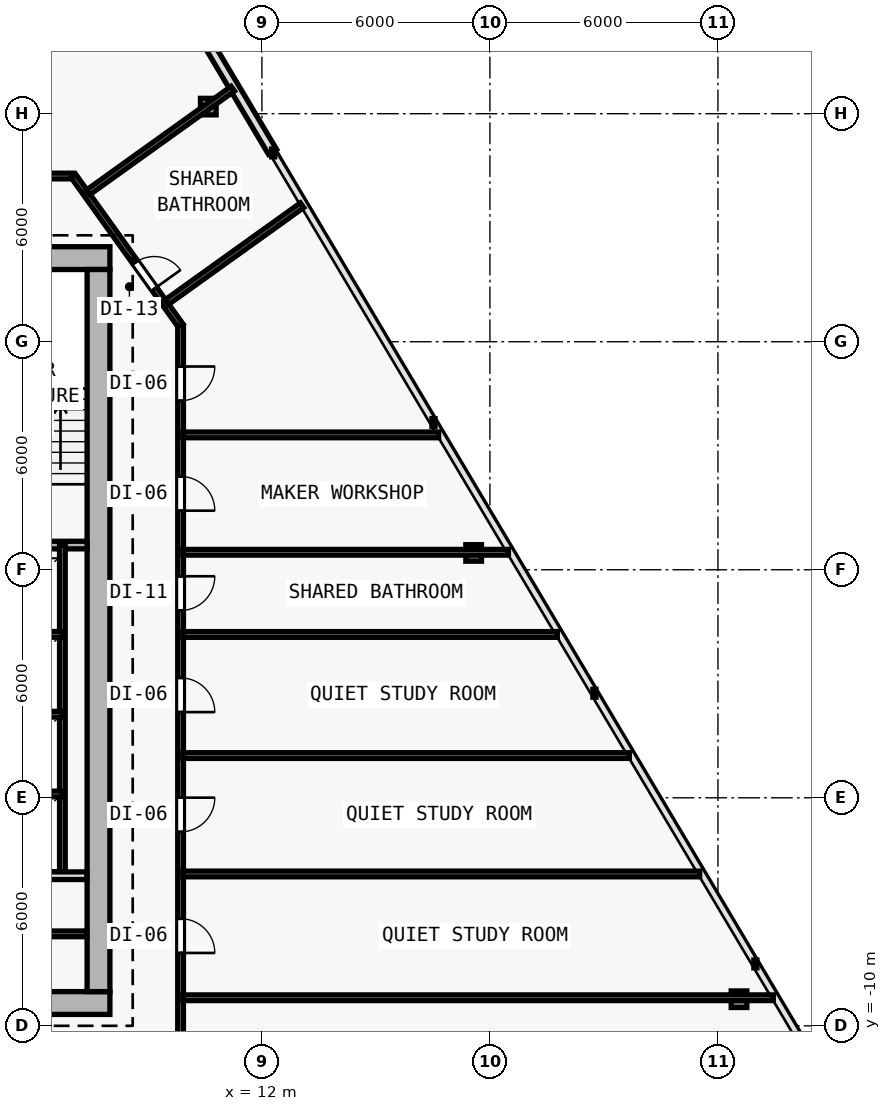
"""IFC4 building model, lengths in metres.
Left out: names, types, materials, properties, quantities, classifications, styles, units other than length and angle.
Written with IfcOpenShell. Run it as: python <this file> out.ifc"""

import sys

from ifc_helpers import new_model, si_unit, direction, frame, frame_2d, origin, origin_2d, place, context, subcontext, project, spatial, rectangle, i_section, extrude, element, fill, save


model = new_model("IFC4")
c1 = context("Model", 3, precision=1e-05, world=origin(), true_north=direction((0.0, 1.0)))
c2 = subcontext(c1, "Body", "Model", "MODEL_VIEW")
j1 = project(units=[si_unit("LENGTHUNIT", "METRE"), si_unit("PLANEANGLEUNIT", "RADIAN")], contexts=[c1])
p1 = place(None, origin())
s1 = spatial("IfcSite", under=j1, at=p1, CompositionType="ELEMENT")
p2 = place(p1, origin())
s2 = spatial("IfcBuilding", under=s1, at=p2, CompositionType="ELEMENT")
p3 = place(p2, frame((0.0, 0.0, 51.6)))
s3 = spatial("IfcBuildingStorey", under=s2, at=p3, CompositionType="ELEMENT", Elevation=51.6)
for number, where, z_axis, x_axis in (
    (1, (7.7, -9.4, 0.0), (0.0, 0.0, 1.0), (1.0, 0.0, 0.0)),
    (2, (7.7, 10.2, 0.0), (0.0, 0.0, 1.0), (1.0, 0.0, 0.0)),
    (3, (7.7, 0.4, 0.0), (0.0, 0.0, 1.0), (1.0, 0.0, 0.0)),
):
    element("IfcColumn", number, at=place(p3, frame(where, z_axis=z_axis, x_axis=x_axis)), inside=s3, PredefinedType="COLUMN", context=c2, shape_type="SweptSolid", body=[
        extrude(i_section(OverallWidth=0.416, OverallDepth=0.446, WebThickness=0.025, FlangeThickness=0.04, FilletRadius=0.015, at=origin_2d()), origin(), (0.0, 0.0, 1.0), 3.6),
    ])
p4 = place(p3, frame((24.555, -9.3, 0.005), z_axis=(-0.026105663043, 0.021618752208, 0.999425396871), x_axis=(-0.637813971185, -0.770190455771, 0.0)))
e4 = element("IfcColumn", 4, at=p4, inside=s3, PredefinedType="COLUMN", context=c2, shape_type="SweptSolid", body=[
    extrude(i_section(OverallWidth=0.412, OverallDepth=0.435, WebThickness=0.023, FlangeThickness=0.037, FilletRadius=0.015, at=origin_2d()), origin(), (0.0, 0.0, 1.0), 3.591),
])
p5 = place(p3, frame((17.572, 2.443, 0.005), z_axis=(-0.018906041, 0.009521027842, 0.999775930718), x_axis=(-0.449781931574, -0.893138406984, 0.0)))
e5 = element("IfcColumn", 5, at=p5, inside=s3, PredefinedType="COLUMN", context=c2, shape_type="SweptSolid", body=[
    extrude(i_section(OverallWidth=0.412, OverallDepth=0.435, WebThickness=0.023, FlangeThickness=0.037, FilletRadius=0.015, at=origin_2d()), origin(), (0.0, 0.0, 1.0), 3.59),
])
p6 = place(p3, frame((10.589, 14.186, 0.005), z_axis=(-0.011699046613, -0.002516655376, 0.999928396814), x_axis=(0.210305364179, -0.977635746993, 0.0)))
e6 = element("IfcColumn", 6, at=p6, inside=s3, PredefinedType="COLUMN", context=c2, shape_type="SweptSolid", body=[
    extrude(i_section(OverallWidth=0.412, OverallDepth=0.435, WebThickness=0.023, FlangeThickness=0.037, FilletRadius=0.015, at=origin_2d()), origin(), (0.0, 0.0, 1.0), 3.589),
])
p7 = place(p3, frame((6.328, 23.006, 0.0), z_axis=(0.0, 0.0, 1.0), x_axis=(0.511075811474, -0.859535639125, 0.0)))
e7 = element("IfcWall", 7, at=p7, inside=s3, PredefinedType="SOLIDWALL", context=c2, shape_type="SweptSolid", body=[
    extrude(rectangle(XDim=11.646, YDim=0.25, at=frame_2d((5.823, 0.0))), origin(), (0.0, 0.0, 1.0), 3.35),
])
p8 = place(p7, frame((5.273, 0.0, 0.62)))
e8 = element("IfcOpeningElement", 8, at=p8, cuts=e7, PredefinedType="OPENING", context=c2, shape_type="SweptSolid", body=[
    extrude(rectangle(XDim=1.1, YDim=1.8, at=frame_2d((0.55, 0.9))), frame((0.0, 0.135, 0.0), z_axis=(0.0, -1.0, 0.0), x_axis=(1.0, 0.0, 0.0)), (0.0, 0.0, 1.0), 0.27),
])
p9 = place(p3, frame((-8.0, -9.4, 0.0), z_axis=(0.0, 0.0, 1.0), x_axis=(1.0, 0.0, 0.0)))
e9 = element("IfcWall", 9, at=p9, inside=s3, PredefinedType="SHEAR", context=c2, shape_type="SweptSolid", body=[
    extrude(rectangle(XDim=16.0, YDim=0.6, at=frame_2d((8.0, 0.0))), origin(), (0.0, 0.0, 1.0), 3.35),
])
p10 = place(p9, frame((9.65, 0.0, 0.0)))
e10 = element("IfcOpeningElement", 10, at=p10, cuts=e9, PredefinedType="OPENING", context=c2, shape_type="SweptSolid", body=[
    extrude(rectangle(XDim=1.5, YDim=2.2, at=frame_2d((0.75, 1.1))), frame((0.0, 0.31, 0.0), z_axis=(0.0, -1.0, 0.0), x_axis=(1.0, 0.0, 0.0)), (0.0, 0.0, 1.0), 0.62),
])
p11 = place(p3, frame((8.0, 10.2, 0.0), z_axis=(0.0, 0.0, 1.0), x_axis=(-1.0, 0.0, 0.0)))
e11 = element("IfcWall", 11, at=p11, inside=s3, PredefinedType="SHEAR", context=c2, shape_type="SweptSolid", body=[
    extrude(rectangle(XDim=16.0, YDim=0.6, at=frame_2d((8.0, 0.0))), origin(), (0.0, 0.0, 1.0), 3.35),
])
p12 = place(p11, frame((4.45, 0.0, 0.0)))
e12 = element("IfcOpeningElement", 12, at=p12, cuts=e11, PredefinedType="OPENING", context=c2, shape_type="SweptSolid", body=[
    extrude(rectangle(XDim=1.1, YDim=2.15, at=frame_2d((0.55, 1.075))), frame((0.0, 0.31, 0.0), z_axis=(0.0, -1.0, 0.0), x_axis=(1.0, 0.0, 0.0)), (0.0, 0.0, 1.0), 0.62),
])
p13 = place(p3, frame((7.7, 9.9, 0.0), z_axis=(0.0, 0.0, 1.0), x_axis=(0.0, -1.0, 0.0)))
e13 = element("IfcWall", 13, at=p13, inside=s3, PredefinedType="SHEAR", context=c2, shape_type="SweptSolid", body=[
    extrude(rectangle(XDim=19.0, YDim=0.6, at=frame_2d((9.5, 0.0))), origin(), (0.0, 0.0, 1.0), 3.35),
])
p14 = place(p3, frame((4.05, 2.65, 0.0), z_axis=(0.0, 0.0, 1.0), x_axis=(1.0, 0.0, 0.0)))
e14 = element("IfcWall", 14, at=p14, inside=s3, PredefinedType="SOLIDWALL", context=c2, shape_type="SweptSolid", body=[
    extrude(rectangle(XDim=3.35, YDim=0.2, at=frame_2d((1.675, 0.0))), origin(), (0.0, 0.0, 1.0), 3.35),
])
p15 = place(p3, frame((6.75, -6.05, 0.0), z_axis=(0.0, 0.0, 1.0), x_axis=(0.0, 1.0, 0.0)))
e15 = element("IfcWall", 15, at=p15, inside=s3, PredefinedType="PARTITIONING", context=c2, shape_type="SweptSolid", body=[
    extrude(rectangle(XDim=8.7, YDim=0.15, at=frame_2d((4.35, 0.0))), origin(), (0.0, 0.0, 1.0), 3.35),
])
for number, where, z_axis, x_axis in (
    (16, (4.15, -3.9, 0.0), (0.0, 0.0, 1.0), (1.0, 0.0, 0.0)),
    (17, (4.15, -1.8, 0.0), (0.0, 0.0, 1.0), (1.0, 0.0, 0.0)),
    (18, (4.15, 0.3, 0.0), (0.0, 0.0, 1.0), (1.0, 0.0, 0.0)),
):
    element("IfcWall", number, at=place(p3, frame(where, z_axis=z_axis, x_axis=x_axis)), inside=s3, PredefinedType="PARTITIONING", context=c2, shape_type="SweptSolid", body=[
        extrude(rectangle(XDim=2.6, YDim=0.15, at=frame_2d((1.3, 0.0))), origin(), (0.0, 0.0, 1.0), 3.35),
    ])
p16 = place(p3, frame((4.15, -6.05, 0.0), z_axis=(0.0, 0.0, 1.0), x_axis=(1.0, 0.0, 0.0)))
e19 = element("IfcWall", 19, at=p16, inside=s3, PredefinedType="SOLIDWALL", context=c2, shape_type="SweptSolid", body=[
    extrude(rectangle(XDim=3.245, YDim=0.2, at=frame_2d((1.623, 0.0))), origin(), (0.0, 0.0, 1.0), 3.35),
])
p17 = place(p3, frame((4.15, -7.58, 0.0), z_axis=(0.0, 0.0, 1.0), x_axis=(1.0, 0.0, 0.0)))
e20 = element("IfcWall", 20, at=p17, inside=s3, PredefinedType="PARTITIONING", context=c2, shape_type="SweptSolid", body=[
    extrude(rectangle(XDim=3.245, YDim=0.15, at=frame_2d((1.623, 0.0))), origin(), (0.0, 0.0, 1.0), 3.35),
])
p18 = place(p3, frame((-7.041, 12.36, 0.0), z_axis=(0.0, 0.0, 1.0), x_axis=(1.0, 0.0, 0.0)))
e21 = element("IfcWall", 21, at=p18, inside=s3, PredefinedType="PARTITIONING", context=c2, shape_type="SweptSolid", body=[
    extrude(rectangle(XDim=14.082, YDim=0.15, at=frame_2d((7.041, 0.0))), origin(), (0.0, 0.0, 1.0), 3.35),
])
p19 = place(p18, frame((10.042, 0.0, 0.0)))
e22 = element("IfcOpeningElement", 22, at=p19, cuts=e21, PredefinedType="OPENING", context=c2, shape_type="SweptSolid", body=[
    extrude(rectangle(XDim=0.9, YDim=2.1, at=frame_2d((0.45, 1.05))), frame((0.0, 0.085, 0.0), z_axis=(0.0, -1.0, 0.0), x_axis=(1.0, 0.0, 0.0)), (0.0, 0.0, 1.0), 0.17),
])
p20 = place(p18, frame((3.179, 0.0, 0.0)))
e23 = element("IfcOpeningElement", 23, at=p20, cuts=e21, PredefinedType="OPENING", context=c2, shape_type="SweptSolid", body=[
    extrude(rectangle(XDim=0.9, YDim=2.1, at=frame_2d((0.45, 1.05))), frame((0.0, 0.085, 0.0), z_axis=(0.0, -1.0, 0.0), x_axis=(1.0, 0.0, 0.0)), (0.0, 0.0, 1.0), 0.17),
])
p21 = place(p3, frame((7.041, 12.36, 0.0), z_axis=(0.0, 0.0, 1.0), x_axis=(0.582449511476, -0.812866881218, 0.0)))
e24 = element("IfcWall", 24, at=p21, inside=s3, PredefinedType="PARTITIONING", context=c2, shape_type="SweptSolid", body=[
    extrude(rectangle(XDim=4.84, YDim=0.15, at=frame_2d((2.42, 0.0))), origin(), (0.0, 0.0, 1.0), 2.725),
])
p22 = place(p21, frame((2.801, 0.0, 0.0)))
e25 = element("IfcOpeningElement", 25, at=p22, cuts=e24, PredefinedType="OPENING", context=c2, shape_type="SweptSolid", body=[
    extrude(rectangle(XDim=0.85, YDim=2.1, at=frame_2d((0.425, 1.05))), frame((0.0, 0.085, 0.0), z_axis=(0.0, -1.0, 0.0), x_axis=(1.0, 0.0, 0.0)), (0.0, 0.0, 1.0), 0.17),
])
p23 = place(p3, frame((9.86, 8.426, 0.0), z_axis=(0.0, 0.0, 1.0), x_axis=(0.0, -1.0, 0.0)))
e26 = element("IfcWall", 26, at=p23, inside=s3, PredefinedType="PARTITIONING", context=c2, shape_type="SweptSolid", body=[
    extrude(rectangle(XDim=19.986, YDim=0.15, at=frame_2d((9.993, 0.0))), origin(), (0.0, 0.0, 1.0), 2.609),
])
p24 = place(p23, frame((15.608, 0.0, 0.0)))
e27 = element("IfcOpeningElement", 27, at=p24, cuts=e26, PredefinedType="OPENING", context=c2, shape_type="SweptSolid", body=[
    extrude(rectangle(XDim=0.9, YDim=2.1, at=frame_2d((0.45, 1.05))), frame((0.0, 0.085, 0.0), z_axis=(0.0, -1.0, 0.0), x_axis=(1.0, 0.0, 0.0)), (0.0, 0.0, 1.0), 0.17),
])
p25 = place(p23, frame((12.422, 0.0, 0.0)))
e28 = element("IfcOpeningElement", 28, at=p25, cuts=e26, PredefinedType="OPENING", context=c2, shape_type="SweptSolid", body=[
    extrude(rectangle(XDim=0.9, YDim=2.1, at=frame_2d((0.45, 1.05))), frame((0.0, 0.085, 0.0), z_axis=(0.0, -1.0, 0.0), x_axis=(1.0, 0.0, 0.0)), (0.0, 0.0, 1.0), 0.17),
])
p26 = place(p23, frame((9.271, 0.0, 0.0)))
e29 = element("IfcOpeningElement", 29, at=p26, cuts=e26, PredefinedType="OPENING", context=c2, shape_type="SweptSolid", body=[
    extrude(rectangle(XDim=0.9, YDim=2.1, at=frame_2d((0.45, 1.05))), frame((0.0, 0.085, 0.0), z_axis=(0.0, -1.0, 0.0), x_axis=(1.0, 0.0, 0.0)), (0.0, 0.0, 1.0), 0.17),
])
p27 = place(p23, frame((6.597, 0.0, 0.0)))
e30 = element("IfcOpeningElement", 30, at=p27, cuts=e26, PredefinedType="OPENING", context=c2, shape_type="SweptSolid", body=[
    extrude(rectangle(XDim=0.9, YDim=2.1, at=frame_2d((0.45, 1.05))), frame((0.0, 0.085, 0.0), z_axis=(0.0, -1.0, 0.0), x_axis=(1.0, 0.0, 0.0)), (0.0, 0.0, 1.0), 0.17),
])
p28 = place(p23, frame((3.971, 0.0, 0.0)))
e31 = element("IfcOpeningElement", 31, at=p28, cuts=e26, PredefinedType="OPENING", context=c2, shape_type="SweptSolid", body=[
    extrude(rectangle(XDim=0.9, YDim=2.1, at=frame_2d((0.45, 1.05))), frame((0.0, 0.085, 0.0), z_axis=(0.0, -1.0, 0.0), x_axis=(1.0, 0.0, 0.0)), (0.0, 0.0, 1.0), 0.17),
])
p29 = place(p23, frame((1.078, 0.0, 0.0)))
e32 = element("IfcOpeningElement", 32, at=p29, cuts=e26, PredefinedType="OPENING", context=c2, shape_type="SweptSolid", body=[
    extrude(rectangle(XDim=0.9, YDim=2.1, at=frame_2d((0.45, 1.05))), frame((0.0, 0.085, 0.0), z_axis=(0.0, -1.0, 0.0), x_axis=(1.0, 0.0, 0.0)), (0.0, 0.0, 1.0), 0.17),
])
p30 = place(p3, frame((9.92, -9.261, 0.0), z_axis=(0.0, 0.0, 1.0), x_axis=(1.0, 0.0, 0.0)))
e33 = element("IfcWall", 33, at=p30, inside=s3, PredefinedType="PARTITIONING", context=c2, shape_type="SweptSolid", body=[
    extrude(rectangle(XDim=15.537, YDim=0.15, at=frame_2d((7.768, 0.0))), origin(), (0.0, 0.0, 1.0), 2.609),
])
p31 = place(p3, frame((9.92, 2.46, 0.0), z_axis=(0.0, 0.0, 1.0), x_axis=(1.0, 0.0, 0.0)))
e34 = element("IfcWall", 34, at=p31, inside=s3, PredefinedType="PARTITIONING", context=c2, shape_type="SweptSolid", body=[
    extrude(rectangle(XDim=8.567, YDim=0.15, at=frame_2d((4.283, 0.0))), origin(), (0.0, 0.0, 1.0), 2.735),
])
p32 = place(p3, frame((7.424, 11.929, 0.0), z_axis=(0.0, 0.0, 1.0), x_axis=(0.812887830599, 0.582420273397, 0.0)))
e35 = element("IfcWall", 35, at=p32, inside=s3, PredefinedType="PARTITIONING", context=c2, shape_type="SweptSolid", body=[
    extrude(rectangle(XDim=4.687, YDim=0.15, at=frame_2d((2.343, 0.0))), origin(), (0.0, 0.0, 1.0), 2.725),
])
p33 = place(p3, frame((9.92, -2.889, 0.0), z_axis=(0.0, 0.0, 1.0), x_axis=(1.0, 0.0, 0.0)))
e36 = element("IfcWall", 36, at=p33, inside=s3, PredefinedType="PARTITIONING", context=c2, shape_type="SweptSolid", body=[
    extrude(rectangle(XDim=11.747, YDim=0.15, at=frame_2d((5.874, 0.0))), origin(), (0.0, 0.0, 1.0), 2.735),
])
p34 = place(p3, frame((9.494, 9.039, 0.0), z_axis=(0.0, 0.0, 1.0), x_axis=(0.812885700903, 0.582423245816, 0.0)))
e37 = element("IfcWall", 37, at=p34, inside=s3, PredefinedType="PARTITIONING", context=c2, shape_type="SweptSolid", body=[
    extrude(rectangle(XDim=4.383, YDim=0.15, at=frame_2d((2.191, 0.0))), origin(), (0.0, 0.0, 1.0), 2.735),
])
p35 = place(p3, frame((9.92, -6.004, 0.0), z_axis=(0.0, 0.0, 1.0), x_axis=(1.0, 0.0, 0.0)))
e38 = element("IfcWall", 38, at=p35, inside=s3, PredefinedType="PARTITIONING", context=c2, shape_type="SweptSolid", body=[
    extrude(rectangle(XDim=13.6, YDim=0.15, at=frame_2d((6.8, 0.0))), origin(), (0.0, 0.0, 1.0), 2.735),
])
p36 = place(p3, frame((9.92, 0.298, 0.0), z_axis=(0.0, 0.0, 1.0), x_axis=(1.0, 0.0, 0.0)))
e39 = element("IfcWall", 39, at=p36, inside=s3, PredefinedType="PARTITIONING", context=c2, shape_type="SweptSolid", body=[
    extrude(rectangle(XDim=9.853, YDim=0.15, at=frame_2d((4.926, 0.0))), origin(), (0.0, 0.0, 1.0), 2.735),
])
p37 = place(p3, frame((9.92, 5.549, 0.0), z_axis=(0.0, 0.0, 1.0), x_axis=(1.0, 0.0, 0.0)))
e40 = element("IfcWall", 40, at=p37, inside=s3, PredefinedType="PARTITIONING", context=c2, shape_type="SweptSolid", body=[
    extrude(rectangle(XDim=6.73, YDim=0.15, at=frame_2d((3.365, 0.0))), origin(), (0.0, 0.0, 1.0), 2.735),
])
p38 = place(p24, origin())
e41 = element("IfcDoor", 41, at=p38, inside=s3, OperationType="SINGLE_SWING_RIGHT", PredefinedType="DOOR", context=c2, shape_type="SweptSolid", body=[
    extrude(rectangle(XDim=0.9, YDim=2.1, at=frame_2d((0.45, 1.05))), frame((0.0, 0.025, 0.0), z_axis=(0.0, -1.0, 0.0), x_axis=(1.0, 0.0, 0.0)), (0.0, 0.0, 1.0), 0.05),
])
fill(e27, e41)
p39 = place(p25, origin())
e42 = element("IfcDoor", 42, at=p39, inside=s3, OperationType="SINGLE_SWING_LEFT", PredefinedType="DOOR", context=c2, shape_type="SweptSolid", body=[
    extrude(rectangle(XDim=0.9, YDim=2.1, at=frame_2d((0.45, 1.05))), frame((0.0, 0.025, 0.0), z_axis=(0.0, -1.0, 0.0), x_axis=(1.0, 0.0, 0.0)), (0.0, 0.0, 1.0), 0.05),
])
fill(e28, e42)
p40 = place(p26, origin())
e43 = element("IfcDoor", 43, at=p40, inside=s3, OperationType="SINGLE_SWING_RIGHT", PredefinedType="DOOR", context=c2, shape_type="SweptSolid", body=[
    extrude(rectangle(XDim=0.9, YDim=2.1, at=frame_2d((0.45, 1.05))), frame((0.0, 0.025, 0.0), z_axis=(0.0, -1.0, 0.0), x_axis=(1.0, 0.0, 0.0)), (0.0, 0.0, 1.0), 0.05),
])
fill(e29, e43)
p41 = place(p27, origin())
e44 = element("IfcDoor", 44, at=p41, inside=s3, OperationType="SINGLE_SWING_LEFT", PredefinedType="DOOR", context=c2, shape_type="SweptSolid", body=[
    extrude(rectangle(XDim=0.9, YDim=2.1, at=frame_2d((0.45, 1.05))), frame((0.0, 0.025, 0.0), z_axis=(0.0, -1.0, 0.0), x_axis=(1.0, 0.0, 0.0)), (0.0, 0.0, 1.0), 0.05),
])
fill(e30, e44)
p42 = place(p28, origin())
e45 = element("IfcDoor", 45, at=p42, inside=s3, OperationType="SINGLE_SWING_RIGHT", PredefinedType="DOOR", context=c2, shape_type="SweptSolid", body=[
    extrude(rectangle(XDim=0.9, YDim=2.1, at=frame_2d((0.45, 1.05))), frame((0.0, 0.025, 0.0), z_axis=(0.0, -1.0, 0.0), x_axis=(1.0, 0.0, 0.0)), (0.0, 0.0, 1.0), 0.05),
])
fill(e31, e45)
p43 = place(p29, origin())
e46 = element("IfcDoor", 46, at=p43, inside=s3, OperationType="SINGLE_SWING_LEFT", PredefinedType="DOOR", context=c2, shape_type="SweptSolid", body=[
    extrude(rectangle(XDim=0.9, YDim=2.1, at=frame_2d((0.45, 1.05))), frame((0.0, 0.025, 0.0), z_axis=(0.0, -1.0, 0.0), x_axis=(1.0, 0.0, 0.0)), (0.0, 0.0, 1.0), 0.05),
])
fill(e32, e46)
p44 = place(p22, origin())
e47 = element("IfcDoor", 47, at=p44, inside=s3, OperationType="SINGLE_SWING_RIGHT", PredefinedType="DOOR", context=c2, shape_type="SweptSolid", body=[
    extrude(rectangle(XDim=0.85, YDim=2.1, at=frame_2d((0.425, 1.05))), frame((0.0, 0.025, 0.0), z_axis=(0.0, -1.0, 0.0), x_axis=(1.0, 0.0, 0.0)), (0.0, 0.0, 1.0), 0.05),
])
fill(e25, e47)
save(model, sys.argv[1])
